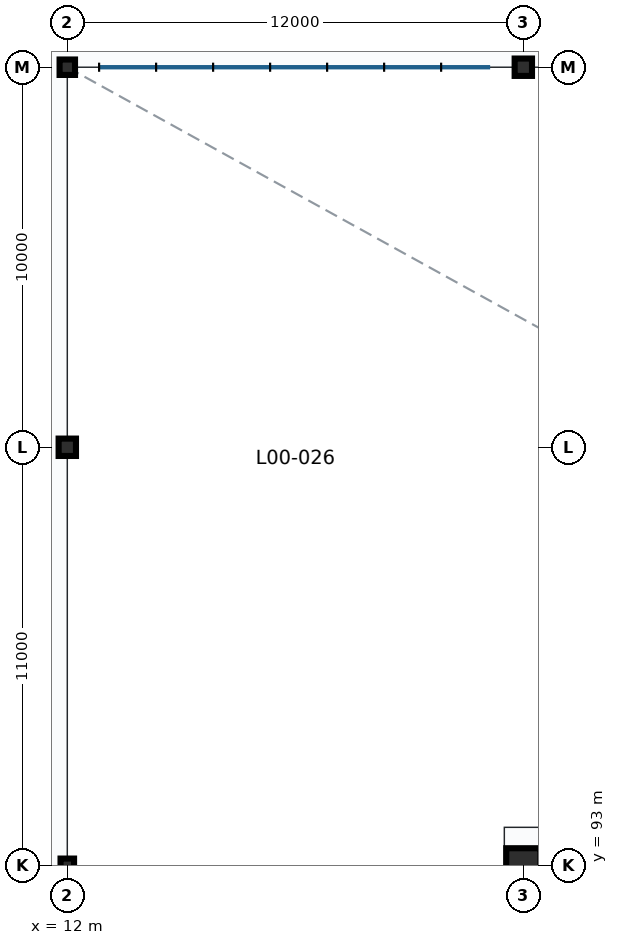
"""IFC4 building model, lengths in metres.
Left out: names, types, materials, properties, quantities, classifications, styles, units other than length and angle.
Written with IfcOpenShell. Run it as: python <this file> out.ifc"""

import sys

from ifc_helpers import new_model, si_unit, direction, frame, origin, origin_2d, place, context, subcontext, project, spatial, circle, hollow_circle, extrude, element, save


model = new_model("IFC4")
c1 = context("Model", 3, precision=1e-05, world=origin(), true_north=direction((0.0, 1.0)))
c2 = subcontext(c1, "Body", "Model", "MODEL_VIEW")
j1 = project(units=[si_unit("LENGTHUNIT", "METRE"), si_unit("PLANEANGLEUNIT", "RADIAN")], contexts=[c1])
p1 = place(None, origin())
s1 = spatial("IfcSite", under=j1, at=p1, CompositionType="ELEMENT")
p2 = place(p1, origin())
s2 = spatial("IfcBuilding", under=s1, at=p2, CompositionType="ELEMENT")
p3 = place(p2, origin())
s3 = spatial("IfcBuildingStorey", under=s2, at=p3, CompositionType="ELEMENT", Elevation=0.0)
p4 = place(p3, frame((12.0, 93.0, 0.0), z_axis=(0.0, 0.0, 1.0), x_axis=(1.0, 0.0, 0.0)))
e1 = element("IfcColumn", 1, at=p4, inside=s3, PredefinedType="PILASTER", context=c2, shape_type="SweptSolid", body=[
    extrude(hollow_circle(Radius=0.178, WallThickness=0.014, at=origin_2d()), origin(), (0.0, 0.0, 1.0), 5.4),
])
p5 = place(p3, frame((12.0, 104.0, 0.0), z_axis=(0.0, 0.0, 1.0), x_axis=(1.0, 0.0, 0.0)))
e2 = element("IfcColumn", 2, at=p5, inside=s3, PredefinedType="PILASTER", context=c2, shape_type="SweptSolid", body=[
    extrude(hollow_circle(Radius=0.229, WallThickness=0.016, at=origin_2d()), origin(), (0.0, 0.0, 1.0), 5.4),
])
p6 = place(p3, frame((12.0, 114.0, 0.0), z_axis=(0.0, 0.0, 1.0), x_axis=(1.0, 0.0, 0.0)))
e3 = element("IfcColumn", 3, at=p6, inside=s3, PredefinedType="PILASTER", context=c2, shape_type="SweptSolid", body=[
    extrude(hollow_circle(Radius=0.203, WallThickness=0.016, at=origin_2d()), origin(), (0.0, 0.0, 1.0), 5.4),
])
p7 = place(p3, frame((24.0, 93.0, 0.0), z_axis=(0.0, 0.0, 1.0), x_axis=(1.0, 0.0, 0.0)))
e4 = element("IfcColumn", 4, at=p7, inside=s3, PredefinedType="COLUMN", context=c2, shape_type="SweptSolid", body=[
    extrude(circle(Radius=0.45, at=origin_2d()), origin(), (0.0, 0.0, 1.0), 5.4),
])
p8 = place(p3, frame((24.0, 114.0, 0.0), z_axis=(0.0, 0.0, 1.0), x_axis=(1.0, 0.0, 0.0)))
e5 = element("IfcColumn", 5, at=p8, inside=s3, PredefinedType="PILASTER", context=c2, shape_type="SweptSolid", body=[
    extrude(hollow_circle(Radius=0.229, WallThickness=0.016, at=origin_2d()), origin(), (0.0, 0.0, 1.0), 5.4),
])
save(model, sys.argv[1])
